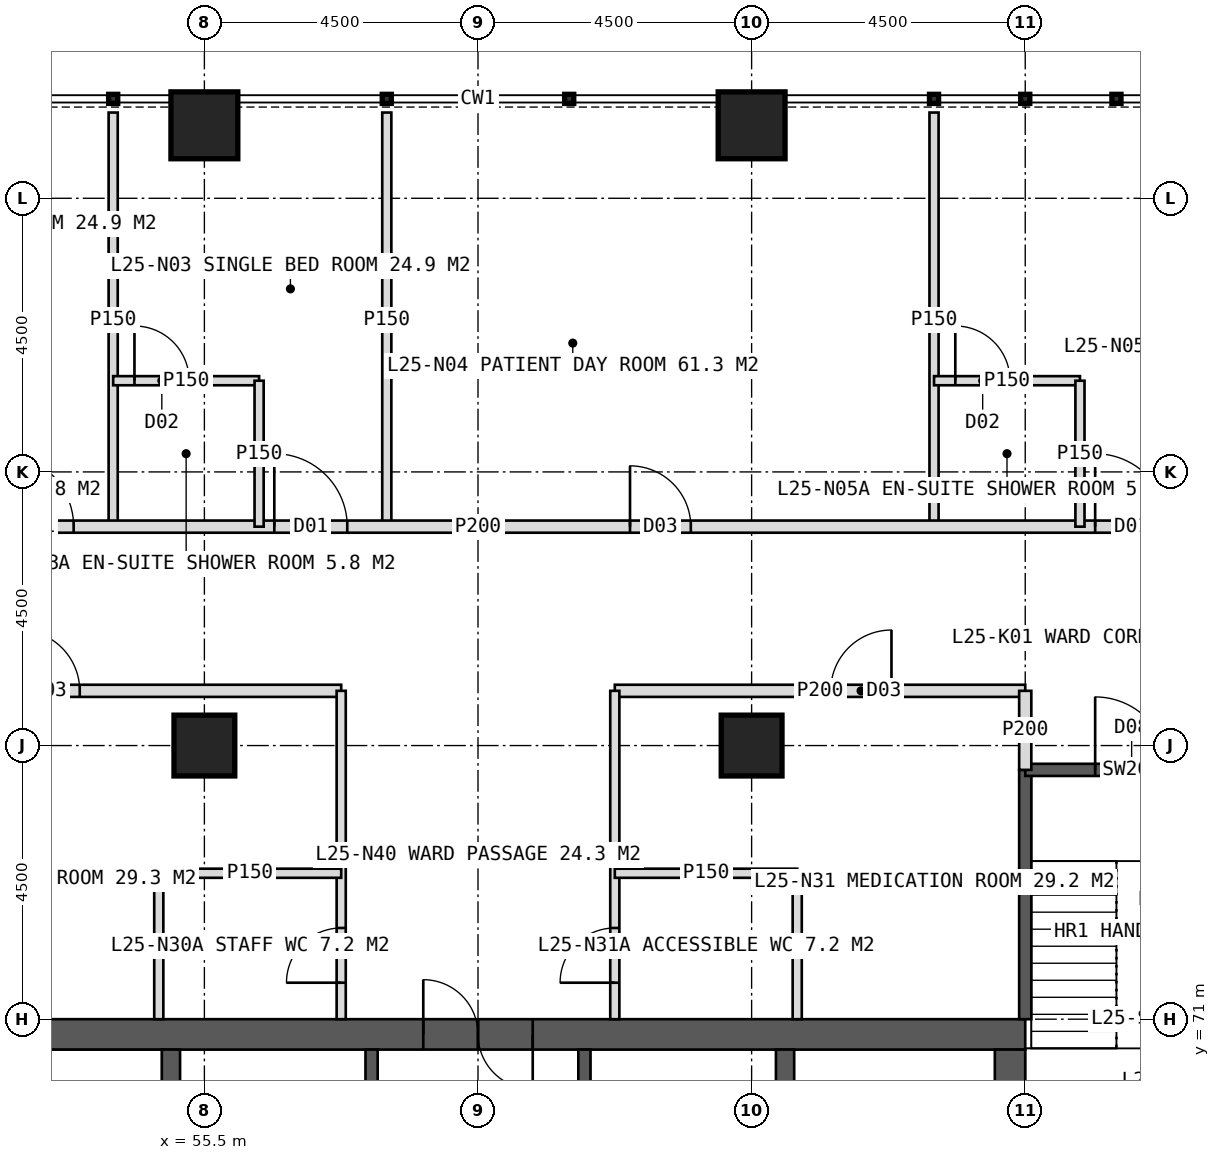
"""IFC4 building model, lengths in metres.
Left out: names, types, materials, properties, quantities, classifications, styles, units other than length and angle.
Written with IfcOpenShell. Run it as: python <this file> out.ifc"""

import sys

from ifc_helpers import new_model, si_unit, direction, frame, frame_2d, origin, origin_2d, place, context, subcontext, project, spatial, rectangle, hollow_rectangle, extrude, element, fill, save


model = new_model("IFC4")
c1 = context("Model", 3, precision=1e-05, world=origin(), true_north=direction((0.0, 1.0)))
c2 = subcontext(c1, "Body", "Model", "MODEL_VIEW")
j1 = project(units=[si_unit("LENGTHUNIT", "METRE"), si_unit("PLANEANGLEUNIT", "RADIAN")], contexts=[c1])
p1 = place(None, origin())
s1 = spatial("IfcSite", under=j1, at=p1, CompositionType="ELEMENT")
p2 = place(p1, origin())
s2 = spatial("IfcBuilding", under=s1, at=p2, CompositionType="ELEMENT")
p3 = place(p2, frame((0.0, 0.0, 108.0)))
s3 = spatial("IfcBuildingStorey", under=s2, at=p3, CompositionType="ELEMENT", Elevation=108.0)
p4 = place(p3, frame((51.0, 70.75, 0.0), z_axis=(0.0, 0.0, 1.0), x_axis=(1.0, 0.0, 0.0)))
e1 = element("IfcWall", 1, at=p4, inside=s3, PredefinedType="SHEAR", context=c2, shape_type="SweptSolid", body=[
    extrude(rectangle(XDim=18.0, YDim=0.5, at=frame_2d((9.0, 0.0))), origin(), (0.0, 0.0, 1.0), 4.0),
])
p5 = place(p4, frame((8.1, 0.0, 0.0)))
e2 = element("IfcOpeningElement", 2, at=p5, cuts=e1, PredefinedType="OPENING", context=c2, shape_type="SweptSolid", body=[
    extrude(rectangle(XDim=1.8, YDim=2.2, at=frame_2d((0.9, 1.1))), frame((0.0, 0.26, 0.0), z_axis=(0.0, -1.0, 0.0), x_axis=(1.0, 0.0, 0.0)), (0.0, 0.0, 1.0), 0.52),
])
p6 = place(p3, frame((68.75, 53.5, 0.0), z_axis=(0.0, 0.0, 1.0), x_axis=(0.0, 1.0, 0.0)))
e3 = element("IfcWall", 3, at=p6, inside=s3, PredefinedType="SHEAR", context=c2, shape_type="SweptSolid", body=[
    extrude(rectangle(XDim=17.0, YDim=0.5, at=frame_2d((8.5, 0.0))), origin(), (0.0, 0.0, 1.0), 4.0),
])
p7 = place(p6, frame((9.5, 0.0, 0.0)))
e4 = element("IfcOpeningElement", 4, at=p7, cuts=e3, PredefinedType="OPENING", context=c2, shape_type="SweptSolid", body=[
    extrude(rectangle(XDim=1.5, YDim=2.2, at=frame_2d((0.75, 1.1))), frame((0.0, 0.26, 0.0), z_axis=(0.0, -1.0, 0.0), x_axis=(1.0, 0.0, 0.0)), (0.0, 0.0, 1.0), 0.52),
])
for number, where, z_axis, x_axis in (
    (5, (54.95, 53.5, 0.0), (0.0, 0.0, 1.0), (0.0, 1.0, 0.0)),
    (6, (65.05, 53.5, 0.0), (0.0, 0.0, 1.0), (0.0, 1.0, 0.0)),
):
    element("IfcWall", number, at=place(p3, frame(where, z_axis=z_axis, x_axis=x_axis)), inside=s3, PredefinedType="SHEAR", context=c2, shape_type="SweptSolid", body=[
        extrude(rectangle(XDim=17.0, YDim=0.3, at=frame_2d((8.5, 0.0))), origin(), (0.0, 0.0, 1.0), 4.0),
    ])
p8 = place(p3, frame((58.25, 53.5, 0.0), z_axis=(0.0, 0.0, 1.0), x_axis=(0.0, 1.0, 0.0)))
e7 = element("IfcWall", 7, at=p8, inside=s3, PredefinedType="SHEAR", context=c2, shape_type="SweptSolid", body=[
    extrude(rectangle(XDim=17.0, YDim=0.2, at=frame_2d((8.5, 0.0))), origin(), (0.0, 0.0, 1.0), 4.0),
])
p9 = place(p8, frame((1.375, 0.0, 0.0)))
e8 = element("IfcOpeningElement", 8, at=p9, cuts=e7, PredefinedType="OPENING", context=c2, shape_type="SweptSolid", body=[
    extrude(rectangle(XDim=1.4, YDim=2.2, at=frame_2d((0.7, 1.1))), frame((0.0, 0.11, 0.0), z_axis=(0.0, -1.0, 0.0), x_axis=(1.0, 0.0, 0.0)), (0.0, 0.0, 1.0), 0.22),
])
p10 = place(p8, frame((5.675, 0.0, 0.0)))
e9 = element("IfcOpeningElement", 9, at=p10, cuts=e7, PredefinedType="OPENING", context=c2, shape_type="SweptSolid", body=[
    extrude(rectangle(XDim=1.4, YDim=2.2, at=frame_2d((0.7, 1.1))), frame((0.0, 0.11, 0.0), z_axis=(0.0, -1.0, 0.0), x_axis=(1.0, 0.0, 0.0)), (0.0, 0.0, 1.0), 0.22),
])
p11 = place(p3, frame((61.75, 53.5, 0.0), z_axis=(0.0, 0.0, 1.0), x_axis=(0.0, 1.0, 0.0)))
e10 = element("IfcWall", 10, at=p11, inside=s3, PredefinedType="SHEAR", context=c2, shape_type="SweptSolid", body=[
    extrude(rectangle(XDim=17.0, YDim=0.2, at=frame_2d((8.5, 0.0))), origin(), (0.0, 0.0, 1.0), 4.0),
])
p12 = place(p11, frame((1.375, 0.0, 0.0)))
e11 = element("IfcOpeningElement", 11, at=p12, cuts=e10, PredefinedType="OPENING", context=c2, shape_type="SweptSolid", body=[
    extrude(rectangle(XDim=1.4, YDim=2.2, at=frame_2d((0.7, 1.1))), frame((0.0, 0.11, 0.0), z_axis=(0.0, -1.0, 0.0), x_axis=(1.0, 0.0, 0.0)), (0.0, 0.0, 1.0), 0.22),
])
p13 = place(p11, frame((5.675, 0.0, 0.0)))
e12 = element("IfcOpeningElement", 12, at=p13, cuts=e10, PredefinedType="OPENING", context=c2, shape_type="SweptSolid", body=[
    extrude(rectangle(XDim=1.4, YDim=2.2, at=frame_2d((0.7, 1.1))), frame((0.0, 0.11, 0.0), z_axis=(0.0, -1.0, 0.0), x_axis=(1.0, 0.0, 0.0)), (0.0, 0.0, 1.0), 0.22),
])
for number, where, z_axis, x_axis in (
    (13, (55.5, 75.5, 0.0), (0.0, 0.0, 1.0), (1.0, 0.0, 0.0)),
    (14, (64.5, 75.5, 0.0), (0.0, 0.0, 1.0), (1.0, 0.0, 0.0)),
):
    element("IfcColumn", number, at=place(p3, frame(where, z_axis=z_axis, x_axis=x_axis)), inside=s3, PredefinedType="COLUMN", context=c2, shape_type="SweptSolid", body=[
        extrude(hollow_rectangle(XDim=1.0, YDim=1.0, WallThickness=0.1, at=origin_2d()), origin(), (0.0, 0.0, 1.0), 4.0),
    ])
for number, where, z_axis, x_axis in (
    (15, (55.5, 85.7, 0.0), (0.0, 0.0, 1.0), (1.0, 0.0, 0.0)),
    (16, (64.5, 85.7, 0.0), (0.0, 0.0, 1.0), (1.0, 0.0, 0.0)),
):
    element("IfcColumn", number, at=place(p3, frame(where, z_axis=z_axis, x_axis=x_axis)), inside=s3, PredefinedType="COLUMN", context=c2, shape_type="SweptSolid", body=[
        extrude(hollow_rectangle(XDim=1.1, YDim=1.1, WallThickness=0.1, at=origin_2d()), origin(), (0.0, 0.0, 1.0), 4.0),
    ])
for number, where, z_axis, x_axis in (
    (17, (54.0, 79.1, 0.0), (0.0, 0.0, 1.0), (0.0, 1.0, 0.0)),
    (18, (58.5, 79.1, 0.0), (0.0, 0.0, 1.0), (0.0, 1.0, 0.0)),
    (19, (67.5, 79.1, 0.0), (0.0, 0.0, 1.0), (0.0, 1.0, 0.0)),
):
    element("IfcWall", number, at=place(p3, frame(where, z_axis=z_axis, x_axis=x_axis)), inside=s3, PredefinedType="PARTITIONING", context=c2, shape_type="SweptSolid", body=[
        extrude(rectangle(XDim=6.81, YDim=0.15, at=frame_2d((3.405, 0.0))), origin(), (0.0, 0.0, 1.0), 3.75),
    ])
p14 = place(p3, frame((42.9, 79.1, 0.0), z_axis=(0.0, 0.0, 1.0), x_axis=(1.0, 0.0, 0.0)))
e20 = element("IfcWall", 20, at=p14, inside=s3, PredefinedType="PARTITIONING", context=c2, shape_type="SweptSolid", body=[
    extrude(rectangle(XDim=34.2, YDim=0.2, at=frame_2d((17.1, 0.0))), origin(), (0.0, 0.0, 1.0), 3.75),
])
p15 = place(p14, frame((3.25, 0.0, 0.0)))
e21 = element("IfcOpeningElement", 21, at=p15, cuts=e20, PredefinedType="OPENING", context=c2, shape_type="SweptSolid", body=[
    extrude(rectangle(XDim=1.2, YDim=2.2, at=frame_2d((0.6, 1.1))), frame((0.0, 0.11, 0.0), z_axis=(0.0, -1.0, 0.0), x_axis=(1.0, 0.0, 0.0)), (0.0, 0.0, 1.0), 0.22),
])
p16 = place(p14, frame((9.25, 0.0, 0.0)))
e22 = element("IfcOpeningElement", 22, at=p16, cuts=e20, PredefinedType="OPENING", context=c2, shape_type="SweptSolid", body=[
    extrude(rectangle(XDim=1.2, YDim=2.2, at=frame_2d((0.6, 1.1))), frame((0.0, 0.11, 0.0), z_axis=(0.0, -1.0, 0.0), x_axis=(1.0, 0.0, 0.0)), (0.0, 0.0, 1.0), 0.22),
])
p17 = place(p14, frame((13.75, 0.0, 0.0)))
e23 = element("IfcOpeningElement", 23, at=p17, cuts=e20, PredefinedType="OPENING", context=c2, shape_type="SweptSolid", body=[
    extrude(rectangle(XDim=1.2, YDim=2.2, at=frame_2d((0.6, 1.1))), frame((0.0, 0.11, 0.0), z_axis=(0.0, -1.0, 0.0), x_axis=(1.0, 0.0, 0.0)), (0.0, 0.0, 1.0), 0.22),
])
p18 = place(p14, frame((19.6, 0.0, 0.0)))
e24 = element("IfcOpeningElement", 24, at=p18, cuts=e20, PredefinedType="OPENING", context=c2, shape_type="SweptSolid", body=[
    extrude(rectangle(XDim=1.0, YDim=2.1, at=frame_2d((0.5, 1.05))), frame((0.0, 0.11, 0.0), z_axis=(0.0, -1.0, 0.0), x_axis=(1.0, 0.0, 0.0)), (0.0, 0.0, 1.0), 0.22),
])
p19 = place(p14, frame((27.25, 0.0, 0.0)))
e25 = element("IfcOpeningElement", 25, at=p19, cuts=e20, PredefinedType="OPENING", context=c2, shape_type="SweptSolid", body=[
    extrude(rectangle(XDim=1.2, YDim=2.2, at=frame_2d((0.6, 1.1))), frame((0.0, 0.11, 0.0), z_axis=(0.0, -1.0, 0.0), x_axis=(1.0, 0.0, 0.0)), (0.0, 0.0, 1.0), 0.22),
])
p20 = place(p3, frame((54.0, 81.5, 0.0), z_axis=(0.0, 0.0, 1.0), x_axis=(1.0, 0.0, 0.0)))
e26 = element("IfcWall", 26, at=p20, inside=s3, PredefinedType="PARTITIONING", context=c2, shape_type="SweptSolid", body=[
    extrude(rectangle(XDim=2.4, YDim=0.15, at=frame_2d((1.2, 0.0))), origin(), (0.0, 0.0, 1.0), 3.75),
])
p21 = place(p20, frame((0.35, 0.0, 0.0)))
e27 = element("IfcOpeningElement", 27, at=p21, cuts=e26, PredefinedType="OPENING", context=c2, shape_type="SweptSolid", body=[
    extrude(rectangle(XDim=0.9, YDim=2.1, at=frame_2d((0.45, 1.05))), frame((0.0, 0.085, 0.0), z_axis=(0.0, -1.0, 0.0), x_axis=(1.0, 0.0, 0.0)), (0.0, 0.0, 1.0), 0.17),
])
p22 = place(p3, frame((56.4, 79.1, 0.0), z_axis=(0.0, 0.0, 1.0), x_axis=(0.0, 1.0, 0.0)))
e28 = element("IfcWall", 28, at=p22, inside=s3, PredefinedType="PARTITIONING", context=c2, shape_type="SweptSolid", body=[
    extrude(rectangle(XDim=2.4, YDim=0.15, at=frame_2d((1.2, 0.0))), origin(), (0.0, 0.0, 1.0), 3.75),
])
p23 = place(p3, frame((67.5, 81.5, 0.0), z_axis=(0.0, 0.0, 1.0), x_axis=(1.0, 0.0, 0.0)))
e29 = element("IfcWall", 29, at=p23, inside=s3, PredefinedType="PARTITIONING", context=c2, shape_type="SweptSolid", body=[
    extrude(rectangle(XDim=2.4, YDim=0.15, at=frame_2d((1.2, 0.0))), origin(), (0.0, 0.0, 1.0), 3.75),
])
p24 = place(p23, frame((0.35, 0.0, 0.0)))
e30 = element("IfcOpeningElement", 30, at=p24, cuts=e29, PredefinedType="OPENING", context=c2, shape_type="SweptSolid", body=[
    extrude(rectangle(XDim=0.9, YDim=2.1, at=frame_2d((0.45, 1.05))), frame((0.0, 0.085, 0.0), z_axis=(0.0, -1.0, 0.0), x_axis=(1.0, 0.0, 0.0)), (0.0, 0.0, 1.0), 0.17),
])
p25 = place(p3, frame((69.9, 79.1, 0.0), z_axis=(0.0, 0.0, 1.0), x_axis=(0.0, 1.0, 0.0)))
e31 = element("IfcWall", 31, at=p25, inside=s3, PredefinedType="PARTITIONING", context=c2, shape_type="SweptSolid", body=[
    extrude(rectangle(XDim=2.4, YDim=0.15, at=frame_2d((1.2, 0.0))), origin(), (0.0, 0.0, 1.0), 3.75),
])
p26 = place(p3, frame((45.6, 76.4, 0.0), z_axis=(0.0, 0.0, 1.0), x_axis=(1.0, 0.0, 0.0)))
e32 = element("IfcWall", 32, at=p26, inside=s3, PredefinedType="PARTITIONING", context=c2, shape_type="SweptSolid", body=[
    extrude(rectangle(XDim=12.15, YDim=0.2, at=frame_2d((6.075, 0.0))), origin(), (0.0, 0.0, 1.0), 3.75),
])
p27 = place(p26, frame((6.85, 0.0, 0.0)))
e33 = element("IfcOpeningElement", 33, at=p27, cuts=e32, PredefinedType="OPENING", context=c2, shape_type="SweptSolid", body=[
    extrude(rectangle(XDim=1.0, YDim=2.1, at=frame_2d((0.5, 1.05))), frame((0.0, 0.11, 0.0), z_axis=(0.0, -1.0, 0.0), x_axis=(1.0, 0.0, 0.0)), (0.0, 0.0, 1.0), 0.22),
])
p28 = place(p3, frame((62.25, 76.4, 0.0), z_axis=(0.0, 0.0, 1.0), x_axis=(1.0, 0.0, 0.0)))
e34 = element("IfcWall", 34, at=p28, inside=s3, PredefinedType="PARTITIONING", context=c2, shape_type="SweptSolid", body=[
    extrude(rectangle(XDim=6.75, YDim=0.2, at=frame_2d((3.375, 0.0))), origin(), (0.0, 0.0, 1.0), 3.75),
])
p29 = place(p28, frame((3.55, 0.0, 0.0)))
e35 = element("IfcOpeningElement", 35, at=p29, cuts=e34, PredefinedType="OPENING", context=c2, shape_type="SweptSolid", body=[
    extrude(rectangle(XDim=1.0, YDim=2.1, at=frame_2d((0.5, 1.05))), frame((0.0, 0.11, 0.0), z_axis=(0.0, -1.0, 0.0), x_axis=(1.0, 0.0, 0.0)), (0.0, 0.0, 1.0), 0.22),
])
p30 = place(p3, frame((57.75, 71.0, 0.0), z_axis=(0.0, 0.0, 1.0), x_axis=(0.0, 1.0, 0.0)))
e36 = element("IfcWall", 36, at=p30, inside=s3, PredefinedType="PARTITIONING", context=c2, shape_type="SweptSolid", body=[
    extrude(rectangle(XDim=5.4, YDim=0.15, at=frame_2d((2.7, 0.0))), origin(), (0.0, 0.0, 1.0), 3.75),
])
p31 = place(p30, frame((0.6, 0.0, 0.0)))
e37 = element("IfcOpeningElement", 37, at=p31, cuts=e36, PredefinedType="OPENING", context=c2, shape_type="SweptSolid", body=[
    extrude(rectangle(XDim=0.9, YDim=2.1, at=frame_2d((0.45, 1.05))), frame((0.0, 0.085, 0.0), z_axis=(0.0, -1.0, 0.0), x_axis=(1.0, 0.0, 0.0)), (0.0, 0.0, 1.0), 0.17),
])
p32 = place(p3, frame((62.25, 71.0, 0.0), z_axis=(0.0, 0.0, 1.0), x_axis=(0.0, 1.0, 0.0)))
e38 = element("IfcWall", 38, at=p32, inside=s3, PredefinedType="PARTITIONING", context=c2, shape_type="SweptSolid", body=[
    extrude(rectangle(XDim=5.4, YDim=0.15, at=frame_2d((2.7, 0.0))), origin(), (0.0, 0.0, 1.0), 3.75),
])
p33 = place(p32, frame((0.6, 0.0, 0.0)))
e39 = element("IfcOpeningElement", 39, at=p33, cuts=e38, PredefinedType="OPENING", context=c2, shape_type="SweptSolid", body=[
    extrude(rectangle(XDim=0.9, YDim=2.1, at=frame_2d((0.45, 1.05))), frame((0.0, 0.085, 0.0), z_axis=(0.0, -1.0, 0.0), x_axis=(1.0, 0.0, 0.0)), (0.0, 0.0, 1.0), 0.17),
])
p34 = place(p3, frame((54.75, 73.4, 0.0), z_axis=(0.0, 0.0, 1.0), x_axis=(1.0, 0.0, 0.0)))
e40 = element("IfcWall", 40, at=p34, inside=s3, PredefinedType="PARTITIONING", context=c2, shape_type="SweptSolid", body=[
    extrude(rectangle(XDim=3.0, YDim=0.15, at=frame_2d((1.5, 0.0))), origin(), (0.0, 0.0, 1.0), 3.75),
])
p35 = place(p3, frame((54.75, 71.0, 0.0), z_axis=(0.0, 0.0, 1.0), x_axis=(0.0, 1.0, 0.0)))
e41 = element("IfcWall", 41, at=p35, inside=s3, PredefinedType="PARTITIONING", context=c2, shape_type="SweptSolid", body=[
    extrude(rectangle(XDim=2.4, YDim=0.15, at=frame_2d((1.2, 0.0))), origin(), (0.0, 0.0, 1.0), 3.75),
])
p36 = place(p3, frame((62.25, 73.4, 0.0), z_axis=(0.0, 0.0, 1.0), x_axis=(1.0, 0.0, 0.0)))
e42 = element("IfcWall", 42, at=p36, inside=s3, PredefinedType="PARTITIONING", context=c2, shape_type="SweptSolid", body=[
    extrude(rectangle(XDim=3.0, YDim=0.15, at=frame_2d((1.5, 0.0))), origin(), (0.0, 0.0, 1.0), 3.75),
])
p37 = place(p3, frame((65.25, 71.0, 0.0), z_axis=(0.0, 0.0, 1.0), x_axis=(0.0, 1.0, 0.0)))
e43 = element("IfcWall", 43, at=p37, inside=s3, PredefinedType="PARTITIONING", context=c2, shape_type="SweptSolid", body=[
    extrude(rectangle(XDim=2.4, YDim=0.15, at=frame_2d((1.2, 0.0))), origin(), (0.0, 0.0, 1.0), 3.75),
])
p38 = place(p3, frame((69.0, 71.0, 0.0), z_axis=(0.0, 0.0, 1.0), x_axis=(0.0, 1.0, 0.0)))
e44 = element("IfcWall", 44, at=p38, inside=s3, PredefinedType="SOLIDWALL", context=c2, shape_type="SweptSolid", body=[
    extrude(rectangle(XDim=4.1, YDim=0.2, at=frame_2d((2.05, 0.0))), origin(), (0.0, 0.0, 1.0), 3.75),
])
p39 = place(p3, frame((69.0, 75.1, 0.0), z_axis=(0.0, 0.0, 1.0), x_axis=(1.0, 0.0, 0.0)))
e45 = element("IfcWall", 45, at=p39, inside=s3, PredefinedType="SOLIDWALL", context=c2, shape_type="SweptSolid", body=[
    extrude(rectangle(XDim=3.5, YDim=0.2, at=frame_2d((1.75, 0.0))), origin(), (0.0, 0.0, 1.0), 3.75),
])
p40 = place(p39, frame((1.15, 0.0, 0.0)))
e46 = element("IfcOpeningElement", 46, at=p40, cuts=e45, PredefinedType="OPENING", context=c2, shape_type="SweptSolid", body=[
    extrude(rectangle(XDim=1.2, YDim=2.1, at=frame_2d((0.6, 1.05))), frame((0.0, 0.11, 0.0), z_axis=(0.0, -1.0, 0.0), x_axis=(1.0, 0.0, 0.0)), (0.0, 0.0, 1.0), 0.22),
])
p41 = place(p3, frame((69.0, 75.1, 0.0), z_axis=(0.0, 0.0, 1.0), x_axis=(0.0, 1.0, 0.0)))
e47 = element("IfcWall", 47, at=p41, inside=s3, PredefinedType="PARTITIONING", context=c2, shape_type="SweptSolid", body=[
    extrude(rectangle(XDim=1.3, YDim=0.2, at=frame_2d((0.65, 0.0))), origin(), (0.0, 0.0, 1.0), 3.75),
])
p42 = place(p16, origin())
e48 = element("IfcDoor", 48, at=p42, inside=s3, OperationType="SINGLE_SWING_LEFT", PredefinedType="DOOR", context=c2, shape_type="SweptSolid", body=[
    extrude(rectangle(XDim=1.2, YDim=2.2, at=frame_2d((0.6, 1.1))), frame((0.0, 0.025, 0.0), z_axis=(0.0, -1.0, 0.0), x_axis=(1.0, 0.0, 0.0)), (0.0, 0.0, 1.0), 0.05),
])
fill(e22, e48)
p43 = place(p17, origin())
e49 = element("IfcDoor", 49, at=p43, inside=s3, OperationType="SINGLE_SWING_LEFT", PredefinedType="DOOR", context=c2, shape_type="SweptSolid", body=[
    extrude(rectangle(XDim=1.2, YDim=2.2, at=frame_2d((0.6, 1.1))), frame((0.0, 0.025, 0.0), z_axis=(0.0, -1.0, 0.0), x_axis=(1.0, 0.0, 0.0)), (0.0, 0.0, 1.0), 0.05),
])
fill(e23, e49)
p44 = place(p21, origin())
e50 = element("IfcDoor", 50, at=p44, inside=s3, OperationType="SINGLE_SWING_LEFT", PredefinedType="DOOR", context=c2, shape_type="SweptSolid", body=[
    extrude(rectangle(XDim=0.9, YDim=2.1, at=frame_2d((0.45, 1.05))), frame((0.0, 0.025, 0.0), z_axis=(0.0, -1.0, 0.0), x_axis=(1.0, 0.0, 0.0)), (0.0, 0.0, 1.0), 0.05),
])
fill(e27, e50)
p45 = place(p18, origin())
e51 = element("IfcDoor", 51, at=p45, inside=s3, OperationType="SINGLE_SWING_LEFT", PredefinedType="DOOR", context=c2, shape_type="SweptSolid", body=[
    extrude(rectangle(XDim=1.0, YDim=2.1, at=frame_2d((0.5, 1.05))), frame((0.0, 0.025, 0.0), z_axis=(0.0, -1.0, 0.0), x_axis=(1.0, 0.0, 0.0)), (0.0, 0.0, 1.0), 0.05),
])
fill(e24, e51)
p46 = place(p19, origin())
e52 = element("IfcDoor", 52, at=p46, inside=s3, OperationType="SINGLE_SWING_LEFT", PredefinedType="DOOR", context=c2, shape_type="SweptSolid", body=[
    extrude(rectangle(XDim=1.2, YDim=2.2, at=frame_2d((0.6, 1.1))), frame((0.0, 0.025, 0.0), z_axis=(0.0, -1.0, 0.0), x_axis=(1.0, 0.0, 0.0)), (0.0, 0.0, 1.0), 0.05),
])
fill(e25, e52)
p47 = place(p24, origin())
e53 = element("IfcDoor", 53, at=p47, inside=s3, OperationType="SINGLE_SWING_LEFT", PredefinedType="DOOR", context=c2, shape_type="SweptSolid", body=[
    extrude(rectangle(XDim=0.9, YDim=2.1, at=frame_2d((0.45, 1.05))), frame((0.0, 0.025, 0.0), z_axis=(0.0, -1.0, 0.0), x_axis=(1.0, 0.0, 0.0)), (0.0, 0.0, 1.0), 0.05),
])
fill(e30, e53)
p48 = place(p31, origin())
e54 = element("IfcDoor", 54, at=p48, inside=s3, OperationType="SINGLE_SWING_LEFT", PredefinedType="DOOR", context=c2, shape_type="SweptSolid", body=[
    extrude(rectangle(XDim=0.9, YDim=2.1, at=frame_2d((0.45, 1.05))), frame((0.0, 0.025, 0.0), z_axis=(0.0, -1.0, 0.0), x_axis=(1.0, 0.0, 0.0)), (0.0, 0.0, 1.0), 0.05),
])
fill(e37, e54)
p49 = place(p27, origin())
e55 = element("IfcDoor", 55, at=p49, inside=s3, OperationType="SINGLE_SWING_LEFT", PredefinedType="DOOR", context=c2, shape_type="SweptSolid", body=[
    extrude(rectangle(XDim=1.0, YDim=2.1, at=frame_2d((0.5, 1.05))), frame((0.0, 0.025, 0.0), z_axis=(0.0, -1.0, 0.0), x_axis=(1.0, 0.0, 0.0)), (0.0, 0.0, 1.0), 0.05),
])
fill(e33, e55)
p50 = place(p33, origin())
e56 = element("IfcDoor", 56, at=p50, inside=s3, OperationType="SINGLE_SWING_LEFT", PredefinedType="DOOR", context=c2, shape_type="SweptSolid", body=[
    extrude(rectangle(XDim=0.9, YDim=2.1, at=frame_2d((0.45, 1.05))), frame((0.0, 0.025, 0.0), z_axis=(0.0, -1.0, 0.0), x_axis=(1.0, 0.0, 0.0)), (0.0, 0.0, 1.0), 0.05),
])
fill(e39, e56)
p51 = place(p29, origin())
e57 = element("IfcDoor", 57, at=p51, inside=s3, OperationType="SINGLE_SWING_RIGHT", PredefinedType="DOOR", context=c2, shape_type="SweptSolid", body=[
    extrude(rectangle(XDim=1.0, YDim=2.1, at=frame_2d((0.5, 1.05))), frame((0.0, 0.025, 0.0), z_axis=(0.0, -1.0, 0.0), x_axis=(1.0, 0.0, 0.0)), (0.0, 0.0, 1.0), 0.05),
])
fill(e35, e57)
p52 = place(p5, origin())
e58 = element("IfcDoor", 58, at=p52, inside=s3, OperationType="DOUBLE_DOOR_SINGLE_SWING", PredefinedType="DOOR", context=c2, shape_type="SweptSolid", body=[
    extrude(rectangle(XDim=1.8, YDim=2.2, at=frame_2d((0.9, 1.1))), frame((0.0, 0.025, 0.0), z_axis=(0.0, -1.0, 0.0), x_axis=(1.0, 0.0, 0.0)), (0.0, 0.0, 1.0), 0.05),
])
fill(e2, e58)
p53 = place(p40, origin())
e59 = element("IfcDoor", 59, at=p53, inside=s3, OperationType="SINGLE_SWING_LEFT", PredefinedType="DOOR", context=c2, shape_type="SweptSolid", body=[
    extrude(rectangle(XDim=1.2, YDim=2.1, at=frame_2d((0.6, 1.05))), frame((0.0, 0.025, 0.0), z_axis=(0.0, -1.0, 0.0), x_axis=(1.0, 0.0, 0.0)), (0.0, 0.0, 1.0), 0.05),
])
fill(e46, e59)
save(model, sys.argv[1])
